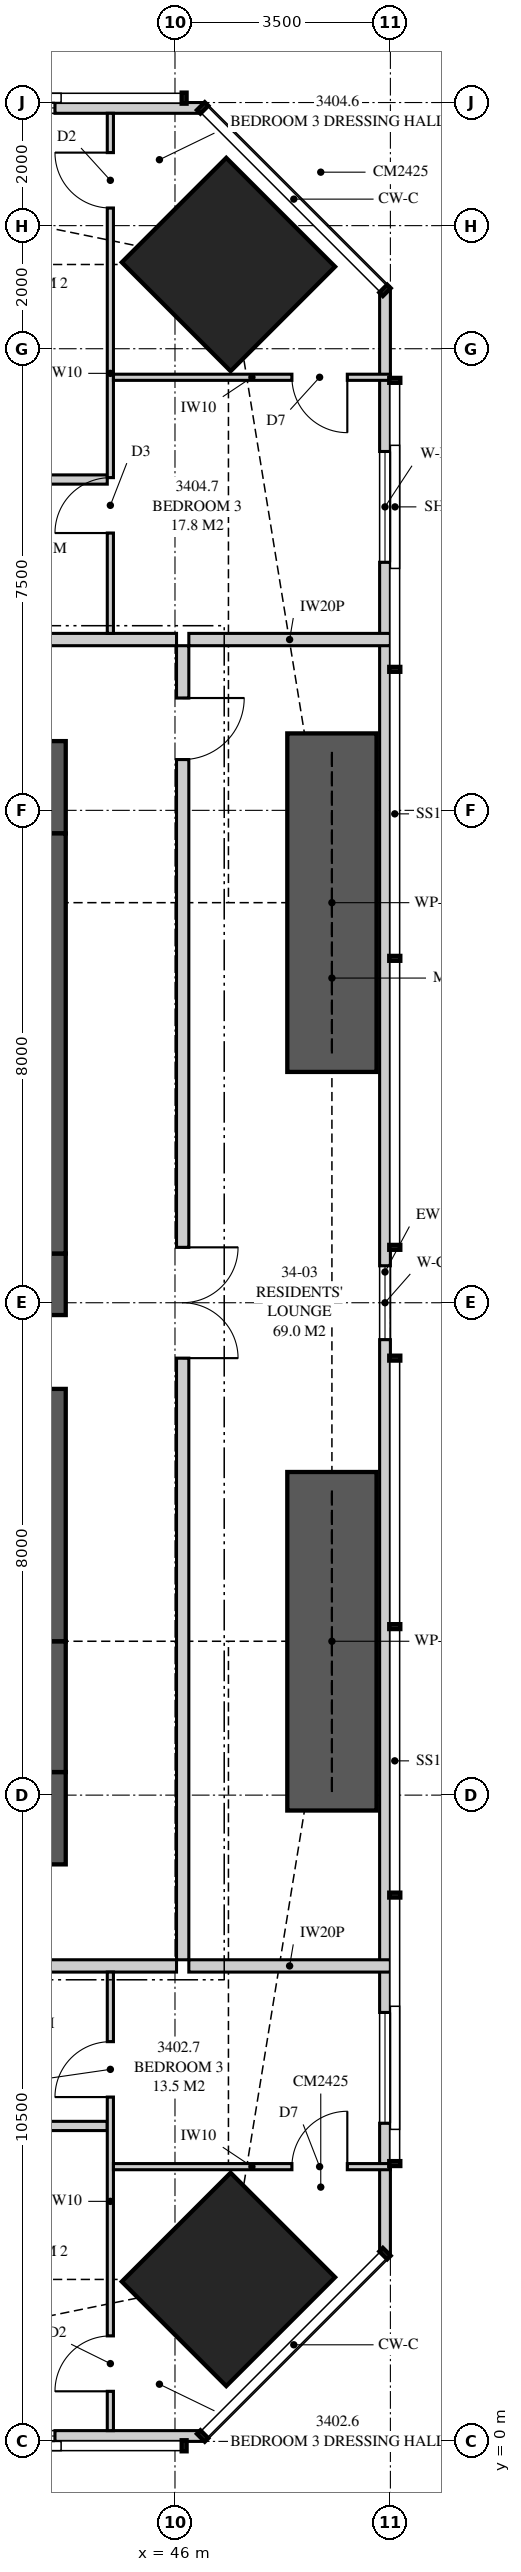
"""IFC4 building model, lengths in metres.
Left out: names, types, materials, properties, quantities, classifications, styles, units other than length and angle.
Written with IfcOpenShell. Run it as: python <this file> out.ifc"""

import sys

from ifc_helpers import new_model, si_unit, direction, frame, frame_2d, origin, origin_2d, place, context, subcontext, project, spatial, polyline, rectangle, outline, extrude, element, fill, save


model = new_model("IFC4")
c1 = context("Model", 3, precision=1e-05, world=origin(), true_north=direction((0.0, 1.0)))
c2 = subcontext(c1, "Body", "Model", "MODEL_VIEW")
j1 = project(units=[si_unit("LENGTHUNIT", "METRE"), si_unit("PLANEANGLEUNIT", "RADIAN")], contexts=[c1])
p1 = place(None, origin())
s1 = spatial("IfcSite", under=j1, at=p1, CompositionType="ELEMENT")
p2 = place(p1, origin())
s2 = spatial("IfcBuilding", under=s1, at=p2, CompositionType="ELEMENT")
p3 = place(p2, frame((0.0, 0.0, 124.95)))
s3 = spatial("IfcBuildingStorey", under=s2, at=p3, CompositionType="ELEMENT", Elevation=124.95)
for number, where, z_axis, x_axis in (
    (1, (46.869, 2.631, 0.0), (0.0, 0.0, 1.0), (-0.707, 0.707, 0.0)),
    (2, (46.869, 35.369, 0.0), (0.0, 0.0, 1.0), (-0.707, -0.707, 0.0)),
):
    element("IfcColumn", number, at=place(p3, frame(where, z_axis=z_axis, x_axis=x_axis)), inside=s3, PredefinedType="COLUMN", context=c2, shape_type="SweptSolid", body=[
        extrude(rectangle(XDim=2.4, YDim=2.5, at=origin_2d()), origin(), (0.0, 0.0, 1.0), 3.35),
    ])
p4 = place(p3, frame((35.9, 10.125, 0.0), z_axis=(0.0, 0.0, 1.0), x_axis=(1.0, 0.0, 0.0)))
e3 = element("IfcWall", 3, at=p4, inside=s3, PredefinedType="SHEAR", context=c2, shape_type="SweptSolid", body=[
    extrude(rectangle(XDim=8.325, YDim=1.5, at=frame_2d((4.163, 0.0))), origin(), (0.0, 0.0, 1.0), 3.35),
])
p5 = place(p4, frame((2.7, 0.0, 0.0)))
e4 = element("IfcOpeningElement", 4, at=p5, cuts=e3, PredefinedType="OPENING", context=c2, shape_type="SweptSolid", body=[
    extrude(rectangle(XDim=1.0, YDim=2.1, at=frame_2d((0.5, 1.05))), frame((0.0, 0.76, 0.0), z_axis=(0.0, -1.0, 0.0), x_axis=(1.0, 0.0, 0.0)), (0.0, 0.0, 1.0), 1.52),
])
p6 = place(p3, frame((44.225, 26.875, 0.0), z_axis=(0.0, 0.0, 1.0), x_axis=(-1.0, 0.0, 0.0)))
e5 = element("IfcWall", 5, at=p6, inside=s3, PredefinedType="SHEAR", context=c2, shape_type="SweptSolid", body=[
    extrude(rectangle(XDim=8.325, YDim=1.5, at=frame_2d((4.163, 0.0))), origin(), (0.0, 0.0, 1.0), 3.35),
])
p7 = place(p6, frame((5.725, 0.0, 0.0)))
e6 = element("IfcOpeningElement", 6, at=p7, cuts=e5, PredefinedType="OPENING", context=c2, shape_type="SweptSolid", body=[
    extrude(rectangle(XDim=0.9, YDim=2.1, at=frame_2d((0.45, 1.05))), frame((0.0, 0.76, 0.0), z_axis=(0.0, -1.0, 0.0), x_axis=(1.0, 0.0, 0.0)), (0.0, 0.0, 1.0), 1.52),
])
p8 = place(p3, frame((43.8, 10.875, 0.0), z_axis=(0.0, 0.0, 1.0), x_axis=(0.0, 1.0, 0.0)))
e7 = element("IfcWall", 7, at=p8, inside=s3, PredefinedType="SHEAR", context=c2, shape_type="SweptSolid", body=[
    extrude(rectangle(XDim=2.125, YDim=0.85, at=frame_2d((1.062, 0.0))), origin(), (0.0, 0.0, 1.0), 3.35),
])
p9 = place(p3, frame((43.8, 13.0, 0.0), z_axis=(0.0, 0.0, 1.0), x_axis=(0.0, 1.0, 0.0)))
e8 = element("IfcWall", 8, at=p9, inside=s3, PredefinedType="SHEAR", context=c2, shape_type="SweptSolid", body=[
    extrude(rectangle(XDim=6.3, YDim=0.85, at=frame_2d((3.15, 0.0))), origin(), (0.0, 0.0, 1.0), 3.35),
])
p10 = place(p9, frame((4.1, 0.0, 0.0)))
e9 = element("IfcOpeningElement", 9, at=p10, cuts=e8, PredefinedType="OPENING", context=c2, shape_type="SweptSolid", body=[
    extrude(rectangle(XDim=1.2, YDim=2.2, at=frame_2d((0.6, 1.1))), frame((0.0, 0.435, 0.0), z_axis=(0.0, -1.0, 0.0), x_axis=(1.0, 0.0, 0.0)), (0.0, 0.0, 1.0), 0.87),
])
p11 = place(p3, frame((43.8, 19.3, 0.0), z_axis=(0.0, 0.0, 1.0), x_axis=(0.0, 1.0, 0.0)))
e10 = element("IfcWall", 10, at=p11, inside=s3, PredefinedType="SHEAR", context=c2, shape_type="SweptSolid", body=[
    extrude(rectangle(XDim=6.825, YDim=0.85, at=frame_2d((3.413, 0.0))), origin(), (0.0, 0.0, 1.0), 3.35),
])
p12 = place(p3, frame((35.775, 0.087, 0.0), z_axis=(0.0, 0.0, 1.0), x_axis=(1.0, 0.0, 0.0)))
e11 = element("IfcWall", 11, at=p12, inside=s3, PredefinedType="SOLIDWALL", context=c2, shape_type="SweptSolid", body=[
    extrude(outline(polyline([(0.0, 0.0), (10.674, 0.0), (10.674, 3.11), (3.053, 3.11), (3.053, 2.15), (3.008, 2.15), (3.008, 3.11), (2.85, 3.11), (2.85, 2.15), (0.0, 2.15), (0.0, 0.0)])), frame((0.0, 0.087, 0.0), z_axis=(0.0, -1.0, 0.0), x_axis=(1.0, 0.0, 0.0)), (0.0, 0.0, 1.0), 0.175),
])
p13 = place(p12, frame((6.475, 0.0, 0.4)))
e12 = element("IfcOpeningElement", 12, at=p13, cuts=e11, PredefinedType="OPENING", context=c2, shape_type="SweptSolid", body=[
    extrude(rectangle(XDim=1.8, YDim=1.7, at=frame_2d((0.9, 0.85))), frame((0.0, 0.097, 0.0), z_axis=(0.0, -1.0, 0.0), x_axis=(1.0, 0.0, 0.0)), (0.0, 0.0, 1.0), 0.195),
])
p14 = place(p3, frame((49.413, 3.051, 0.0), z_axis=(0.0, 0.0, 1.0), x_axis=(0.0, 1.0, 0.0)))
e13 = element("IfcWall", 13, at=p14, inside=s3, PredefinedType="SOLIDWALL", context=c2, shape_type="SweptSolid", body=[
    extrude(outline(polyline([(0.0, 0.0), (31.897, 0.0), (31.897, 3.11), (22.167, 3.11), (22.167, 2.15), (22.074, 2.15), (22.074, 3.11), (21.949, 3.11), (21.949, 2.15), (9.949, 2.15), (9.949, 3.11), (9.823, 3.11), (9.823, 2.15), (9.73, 2.15), (9.73, 3.11), (0.0, 3.11), (0.0, 0.0)])), frame((0.0, 0.087, 0.0), z_axis=(0.0, -1.0, 0.0), x_axis=(1.0, 0.0, 0.0)), (0.0, 0.0, 1.0), 0.175),
])
p15 = place(p14, frame((2.118, 0.0, 0.4)))
e14 = element("IfcOpeningElement", 14, at=p15, cuts=e13, PredefinedType="OPENING", context=c2, shape_type="SweptSolid", body=[
    extrude(rectangle(XDim=1.8, YDim=1.7, at=frame_2d((0.9, 0.85))), frame((0.0, 0.097, 0.0), z_axis=(0.0, -1.0, 0.0), x_axis=(1.0, 0.0, 0.0)), (0.0, 0.0, 1.0), 0.195),
])
p16 = place(p14, frame((14.849, 0.0, 0.4)))
e15 = element("IfcOpeningElement", 15, at=p16, cuts=e13, PredefinedType="OPENING", context=c2, shape_type="SweptSolid", body=[
    extrude(rectangle(XDim=1.2, YDim=1.7, at=frame_2d((0.6, 0.85))), frame((0.0, 0.097, 0.0), z_axis=(0.0, -1.0, 0.0), x_axis=(1.0, 0.0, 0.0)), (0.0, 0.0, 1.0), 0.195),
])
p17 = place(p14, frame((27.479, 0.0, 0.4)))
e16 = element("IfcOpeningElement", 16, at=p17, cuts=e13, PredefinedType="OPENING", context=c2, shape_type="SweptSolid", body=[
    extrude(rectangle(XDim=1.8, YDim=1.7, at=frame_2d((0.9, 0.85))), frame((0.0, 0.097, 0.0), z_axis=(0.0, -1.0, 0.0), x_axis=(1.0, 0.0, 0.0)), (0.0, 0.0, 1.0), 0.195),
])
p18 = place(p3, frame((46.449, 37.913, 0.0), z_axis=(0.0, 0.0, 1.0), x_axis=(-1.0, 0.0, 0.0)))
e17 = element("IfcWall", 17, at=p18, inside=s3, PredefinedType="SOLIDWALL", context=c2, shape_type="SweptSolid", body=[
    extrude(outline(polyline([(0.0, 0.0), (10.674, 0.0), (10.674, 2.15), (7.824, 2.15), (7.824, 3.11), (7.666, 3.11), (7.666, 2.15), (7.62, 2.15), (7.62, 3.11), (0.0, 3.11), (0.0, 0.0)])), frame((0.0, 0.087, 0.0), z_axis=(0.0, -1.0, 0.0), x_axis=(1.0, 0.0, 0.0)), (0.0, 0.0, 1.0), 0.175),
])
p19 = place(p18, frame((2.399, 0.0, 0.4)))
e18 = element("IfcOpeningElement", 18, at=p19, cuts=e17, PredefinedType="OPENING", context=c2, shape_type="SweptSolid", body=[
    extrude(rectangle(XDim=1.8, YDim=1.7, at=frame_2d((0.9, 0.85))), frame((0.0, 0.097, 0.0), z_axis=(0.0, -1.0, 0.0), x_axis=(1.0, 0.0, 0.0)), (0.0, 0.0, 1.0), 0.195),
])
p20 = place(p3, frame((44.95, 0.175, 0.0), z_axis=(0.0, 0.0, 1.0), x_axis=(0.0, 1.0, 0.0)))
e19 = element("IfcWall", 19, at=p20, inside=s3, PredefinedType="PARTITIONING", context=c2, shape_type="SweptSolid", body=[
    extrude(outline(polyline([(0.0, 0.0), (7.45, 0.0), (7.45, 3.11), (3.716, 3.11), (3.716, 2.51), (2.943, 2.51), (2.943, 2.15), (1.188, 2.15), (1.188, 3.11), (0.0, 3.11), (0.0, 0.0)])), frame((0.0, 0.05, 0.0), z_axis=(0.0, -1.0, 0.0), x_axis=(1.0, 0.0, 0.0)), (0.0, 0.0, 1.0), 0.1),
])
p21 = place(p20, frame((0.639, 0.0, 0.0)))
e20 = element("IfcOpeningElement", 20, at=p21, cuts=e19, PredefinedType="OPENING", context=c2, shape_type="SweptSolid", body=[
    extrude(rectangle(XDim=0.9, YDim=2.1, at=frame_2d((0.45, 1.05))), frame((0.0, 0.06, 0.0), z_axis=(0.0, -1.0, 0.0), x_axis=(1.0, 0.0, 0.0)), (0.0, 0.0, 1.0), 0.12),
])
p22 = place(p20, frame((5.419, 0.0, 0.0)))
e21 = element("IfcOpeningElement", 21, at=p22, cuts=e19, PredefinedType="OPENING", context=c2, shape_type="SweptSolid", body=[
    extrude(rectangle(XDim=0.9, YDim=2.1, at=frame_2d((0.45, 1.05))), frame((0.0, 0.06, 0.0), z_axis=(0.0, -1.0, 0.0), x_axis=(1.0, 0.0, 0.0)), (0.0, 0.0, 1.0), 0.12),
])
p23 = place(p3, frame((41.4, 5.125, 0.0), z_axis=(0.0, 0.0, 1.0), x_axis=(1.0, 0.0, 0.0)))
e22 = element("IfcWall", 22, at=p23, inside=s3, PredefinedType="PLUMBINGWALL", context=c2, shape_type="SweptSolid", body=[
    extrude(rectangle(XDim=3.5, YDim=0.15, at=frame_2d((1.75, 0.0))), origin(), (0.0, 0.0, 1.0), 3.11),
])
p24 = place(p3, frame((45.0, 4.464, 0.0), z_axis=(0.0, 0.0, 1.0), x_axis=(1.0, 0.0, 0.0)))
e23 = element("IfcWall", 23, at=p24, inside=s3, PredefinedType="PARTITIONING", context=c2, shape_type="SweptSolid", body=[
    extrude(outline(polyline([(0.0, 0.0), (4.5, 0.0), (4.5, 3.11), (3.037, 3.11), (3.037, 2.15), (1.294, 2.15), (1.294, 3.11), (0.0, 3.11), (0.0, 0.0)])), frame((0.0, 0.05, 0.0), z_axis=(0.0, -1.0, 0.0), x_axis=(1.0, 0.0, 0.0)), (0.0, 0.0, 1.0), 0.1),
])
p25 = place(p24, frame((2.9, 0.0, 0.0)))
e24 = element("IfcOpeningElement", 24, at=p25, cuts=e23, PredefinedType="OPENING", context=c2, shape_type="SweptSolid", body=[
    extrude(rectangle(XDim=0.9, YDim=2.1, at=frame_2d((0.45, 1.05))), frame((0.0, 0.06, 0.0), z_axis=(0.0, -1.0, 0.0), x_axis=(1.0, 0.0, 0.0)), (0.0, 0.0, 1.0), 0.12),
])
p26 = place(p3, frame((46.225, 7.725, 0.0), z_axis=(0.0, 0.0, 1.0), x_axis=(1.0, 0.0, 0.0)))
e25 = element("IfcWall", 25, at=p26, inside=s3, PredefinedType="PARTITIONING", context=c2, shape_type="SweptSolid", body=[
    extrude(outline(polyline([(0.0, 0.0), (3.275, 0.0), (3.275, 3.11), (2.392, 3.11), (2.392, 2.15), (0.643, 2.15), (0.643, 2.541), (0.306, 2.541), (0.306, 3.11), (0.0, 3.11), (0.0, 0.0)])), frame((0.0, 0.1, 0.0), z_axis=(0.0, -1.0, 0.0), x_axis=(1.0, 0.0, 0.0)), (0.0, 0.0, 1.0), 0.2),
])
p27 = place(p3, frame((44.95, 37.825, 0.0), z_axis=(0.0, 0.0, 1.0), x_axis=(0.0, -1.0, 0.0)))
e26 = element("IfcWall", 26, at=p27, inside=s3, PredefinedType="PARTITIONING", context=c2, shape_type="SweptSolid", body=[
    extrude(outline(polyline([(0.0, 0.0), (8.45, 0.0), (8.45, 3.11), (3.716, 3.11), (3.716, 2.51), (2.943, 2.51), (2.943, 2.15), (1.188, 2.15), (1.188, 3.11), (0.0, 3.11), (0.0, 0.0)])), frame((0.0, 0.05, 0.0), z_axis=(0.0, -1.0, 0.0), x_axis=(1.0, 0.0, 0.0)), (0.0, 0.0, 1.0), 0.1),
])
p28 = place(p27, frame((0.639, 0.0, 0.0)))
e27 = element("IfcOpeningElement", 27, at=p28, cuts=e26, PredefinedType="OPENING", context=c2, shape_type="SweptSolid", body=[
    extrude(rectangle(XDim=0.9, YDim=2.1, at=frame_2d((0.45, 1.05))), frame((0.0, 0.06, 0.0), z_axis=(0.0, -1.0, 0.0), x_axis=(1.0, 0.0, 0.0)), (0.0, 0.0, 1.0), 0.12),
])
p29 = place(p27, frame((5.919, 0.0, 0.0)))
e28 = element("IfcOpeningElement", 28, at=p29, cuts=e26, PredefinedType="OPENING", context=c2, shape_type="SweptSolid", body=[
    extrude(rectangle(XDim=0.9, YDim=2.1, at=frame_2d((0.45, 1.05))), frame((0.0, 0.06, 0.0), z_axis=(0.0, -1.0, 0.0), x_axis=(1.0, 0.0, 0.0)), (0.0, 0.0, 1.0), 0.12),
])
p30 = place(p3, frame((41.4, 31.875, 0.0), z_axis=(0.0, 0.0, 1.0), x_axis=(1.0, 0.0, 0.0)))
e29 = element("IfcWall", 29, at=p30, inside=s3, PredefinedType="PLUMBINGWALL", context=c2, shape_type="SweptSolid", body=[
    extrude(rectangle(XDim=3.5, YDim=0.15, at=frame_2d((1.75, 0.0))), origin(), (0.0, 0.0, 1.0), 3.11),
])
p31 = place(p3, frame((45.0, 33.536, 0.0), z_axis=(0.0, 0.0, 1.0), x_axis=(1.0, 0.0, 0.0)))
e30 = element("IfcWall", 30, at=p31, inside=s3, PredefinedType="PARTITIONING", context=c2, shape_type="SweptSolid", body=[
    extrude(outline(polyline([(0.0, 0.0), (4.5, 0.0), (4.5, 3.11), (3.037, 3.11), (3.037, 2.15), (1.294, 2.15), (1.294, 3.11), (0.0, 3.11), (0.0, 0.0)])), frame((0.0, 0.05, 0.0), z_axis=(0.0, -1.0, 0.0), x_axis=(1.0, 0.0, 0.0)), (0.0, 0.0, 1.0), 0.1),
])
p32 = place(p31, frame((2.9, 0.0, 0.0)))
e31 = element("IfcOpeningElement", 31, at=p32, cuts=e30, PredefinedType="OPENING", context=c2, shape_type="SweptSolid", body=[
    extrude(rectangle(XDim=0.9, YDim=2.1, at=frame_2d((0.45, 1.05))), frame((0.0, 0.06, 0.0), z_axis=(0.0, -1.0, 0.0), x_axis=(1.0, 0.0, 0.0)), (0.0, 0.0, 1.0), 0.12),
])
p33 = place(p3, frame((46.225, 29.275, 0.0), z_axis=(0.0, 0.0, 1.0), x_axis=(1.0, 0.0, 0.0)))
e32 = element("IfcWall", 32, at=p33, inside=s3, PredefinedType="PARTITIONING", context=c2, shape_type="SweptSolid", body=[
    extrude(outline(polyline([(0.0, 0.0), (3.275, 0.0), (3.275, 3.11), (2.554, 3.11), (2.554, 2.15), (0.805, 2.15), (0.805, 2.541), (0.306, 2.541), (0.306, 3.11), (0.0, 3.11), (0.0, 0.0)])), frame((0.0, 0.1, 0.0), z_axis=(0.0, -1.0, 0.0), x_axis=(1.0, 0.0, 0.0)), (0.0, 0.0, 1.0), 0.2),
])
p34 = place(p3, frame((46.125, 7.825, 0.0), z_axis=(0.0, 0.0, 1.0), x_axis=(0.0, 1.0, 0.0)))
e33 = element("IfcWall", 33, at=p34, inside=s3, PredefinedType="PARTITIONING", context=c2, shape_type="SweptSolid", body=[
    extrude(outline(polyline([(0.0, 0.0), (21.35, 0.0), (21.35, 3.11), (17.512, 3.11), (17.512, 2.541), (16.838, 2.541), (16.838, 3.11), (5.512, 3.11), (5.512, 2.541), (4.838, 2.541), (4.838, 3.11), (0.0, 3.11), (0.0, 0.0)])), frame((0.0, 0.1, 0.0), z_axis=(0.0, -1.0, 0.0), x_axis=(1.0, 0.0, 0.0)), (0.0, 0.0, 1.0), 0.2),
])
p35 = place(p34, frame((9.775, 0.0, 0.0)))
e34 = element("IfcOpeningElement", 34, at=p35, cuts=e33, PredefinedType="OPENING", context=c2, shape_type="SweptSolid", body=[
    extrude(rectangle(XDim=1.8, YDim=2.1, at=frame_2d((0.9, 1.05))), frame((0.0, 0.11, 0.0), z_axis=(0.0, -1.0, 0.0), x_axis=(1.0, 0.0, 0.0)), (0.0, 0.0, 1.0), 0.22),
])
p36 = place(p34, frame((19.5, 0.0, 0.0)))
e35 = element("IfcOpeningElement", 35, at=p36, cuts=e33, PredefinedType="OPENING", context=c2, shape_type="SweptSolid", body=[
    extrude(rectangle(XDim=1.0, YDim=2.1, at=frame_2d((0.5, 1.05))), frame((0.0, 0.11, 0.0), z_axis=(0.0, -1.0, 0.0), x_axis=(1.0, 0.0, 0.0)), (0.0, 0.0, 1.0), 0.22),
])
p37 = place(p3, frame((39.6, 7.725, 0.0), z_axis=(0.0, 0.0, 1.0), x_axis=(1.0, 0.0, 0.0)))
e36 = element("IfcWall", 36, at=p37, inside=s3, PredefinedType="PARTITIONING", context=c2, shape_type="SweptSolid", body=[
    extrude(rectangle(XDim=6.425, YDim=0.2, at=frame_2d((3.212, 0.0))), origin(), (0.0, 0.0, 1.0), 3.11),
])
p38 = place(p3, frame((40.8, 29.275, 0.0), z_axis=(0.0, 0.0, 1.0), x_axis=(1.0, 0.0, 0.0)))
e37 = element("IfcWall", 37, at=p38, inside=s3, PredefinedType="PARTITIONING", context=c2, shape_type="SweptSolid", body=[
    extrude(rectangle(XDim=5.225, YDim=0.2, at=frame_2d((2.612, 0.0))), origin(), (0.0, 0.0, 1.0), 3.11),
])
for number, where, z_axis, x_axis in (
    (38, (48.55, 10.25, 0.0), (0.0, 0.0, 1.0), (0.0, 1.0, 0.0)),
    (39, (48.55, 22.25, 0.0), (0.0, 0.0, 1.0), (0.0, 1.0, 0.0)),
):
    element("IfcWall", number, at=place(p3, frame(where, z_axis=z_axis, x_axis=x_axis)), inside=s3, PredefinedType="SHEAR", context=c2, shape_type="SweptSolid", body=[
        extrude(rectangle(XDim=5.5, YDim=1.45, at=frame_2d((2.75, 0.0))), origin(), (0.0, 0.0, 1.0), 3.35),
    ])
p39 = place(p13, origin())
e40 = element("IfcWindow", 40, at=p39, inside=s3, PartitioningType="SINGLE_PANEL", PredefinedType="WINDOW", context=c2, shape_type="SweptSolid", body=[
    extrude(rectangle(XDim=1.8, YDim=1.7, at=frame_2d((0.9, 0.85))), frame((0.0, 0.03, 0.0), z_axis=(0.0, -1.0, 0.0), x_axis=(1.0, 0.0, 0.0)), (0.0, 0.0, 1.0), 0.06),
])
fill(e12, e40)
p40 = place(p15, origin())
e41 = element("IfcWindow", 41, at=p40, inside=s3, PartitioningType="SINGLE_PANEL", PredefinedType="WINDOW", context=c2, shape_type="SweptSolid", body=[
    extrude(rectangle(XDim=1.8, YDim=1.7, at=frame_2d((0.9, 0.85))), frame((0.0, 0.03, 0.0), z_axis=(0.0, -1.0, 0.0), x_axis=(1.0, 0.0, 0.0)), (0.0, 0.0, 1.0), 0.06),
])
fill(e14, e41)
p41 = place(p16, origin())
e42 = element("IfcWindow", 42, at=p41, inside=s3, PartitioningType="SINGLE_PANEL", PredefinedType="WINDOW", context=c2, shape_type="SweptSolid", body=[
    extrude(rectangle(XDim=1.2, YDim=1.7, at=frame_2d((0.6, 0.85))), frame((0.0, 0.03, 0.0), z_axis=(0.0, -1.0, 0.0), x_axis=(1.0, 0.0, 0.0)), (0.0, 0.0, 1.0), 0.06),
])
fill(e15, e42)
p42 = place(p17, origin())
e43 = element("IfcWindow", 43, at=p42, inside=s3, PartitioningType="SINGLE_PANEL", PredefinedType="WINDOW", context=c2, shape_type="SweptSolid", body=[
    extrude(rectangle(XDim=1.8, YDim=1.7, at=frame_2d((0.9, 0.85))), frame((0.0, 0.03, 0.0), z_axis=(0.0, -1.0, 0.0), x_axis=(1.0, 0.0, 0.0)), (0.0, 0.0, 1.0), 0.06),
])
fill(e16, e43)
p43 = place(p19, origin())
e44 = element("IfcWindow", 44, at=p43, inside=s3, PartitioningType="SINGLE_PANEL", PredefinedType="WINDOW", context=c2, shape_type="SweptSolid", body=[
    extrude(rectangle(XDim=1.8, YDim=1.7, at=frame_2d((0.9, 0.85))), frame((0.0, 0.03, 0.0), z_axis=(0.0, -1.0, 0.0), x_axis=(1.0, 0.0, 0.0)), (0.0, 0.0, 1.0), 0.06),
])
fill(e18, e44)
p44 = place(p25, origin())
e45 = element("IfcDoor", 45, at=p44, inside=s3, OperationType="SINGLE_SWING_RIGHT", PredefinedType="DOOR", context=c2, shape_type="SweptSolid", body=[
    extrude(rectangle(XDim=0.9, YDim=2.1, at=frame_2d((0.45, 1.05))), frame((0.0, 0.025, 0.0), z_axis=(0.0, -1.0, 0.0), x_axis=(1.0, 0.0, 0.0)), (0.0, 0.0, 1.0), 0.05),
])
fill(e24, e45)
p45 = place(p21, origin())
e46 = element("IfcDoor", 46, at=p45, inside=s3, OperationType="SINGLE_SWING_LEFT", PredefinedType="DOOR", context=c2, shape_type="SweptSolid", body=[
    extrude(rectangle(XDim=0.9, YDim=2.1, at=frame_2d((0.45, 1.05))), frame((0.0, 0.025, 0.0), z_axis=(0.0, -1.0, 0.0), x_axis=(1.0, 0.0, 0.0)), (0.0, 0.0, 1.0), 0.05),
])
fill(e20, e46)
p46 = place(p22, origin())
e47 = element("IfcDoor", 47, at=p46, inside=s3, OperationType="SINGLE_SWING_LEFT", PredefinedType="DOOR", context=c2, shape_type="SweptSolid", body=[
    extrude(rectangle(XDim=0.9, YDim=2.1, at=frame_2d((0.45, 1.05))), frame((0.0, 0.025, 0.0), z_axis=(0.0, -1.0, 0.0), x_axis=(1.0, 0.0, 0.0)), (0.0, 0.0, 1.0), 0.05),
])
fill(e21, e47)
p47 = place(p32, frame((0.9, 0.0, 0.0), z_axis=(0.0, 0.0, 1.0), x_axis=(-1.0, 0.0, 0.0)))
e48 = element("IfcDoor", 48, at=p47, inside=s3, OperationType="SINGLE_SWING_LEFT", PredefinedType="DOOR", context=c2, shape_type="SweptSolid", body=[
    extrude(rectangle(XDim=0.9, YDim=2.1, at=frame_2d((0.45, 1.05))), frame((0.0, 0.025, 0.0), z_axis=(0.0, -1.0, 0.0), x_axis=(1.0, 0.0, 0.0)), (0.0, 0.0, 1.0), 0.05),
])
fill(e31, e48)
p48 = place(p28, frame((0.9, 0.0, 0.0), z_axis=(0.0, 0.0, 1.0), x_axis=(-1.0, 0.0, 0.0)))
e49 = element("IfcDoor", 49, at=p48, inside=s3, OperationType="SINGLE_SWING_RIGHT", PredefinedType="DOOR", context=c2, shape_type="SweptSolid", body=[
    extrude(rectangle(XDim=0.9, YDim=2.1, at=frame_2d((0.45, 1.05))), frame((0.0, 0.025, 0.0), z_axis=(0.0, -1.0, 0.0), x_axis=(1.0, 0.0, 0.0)), (0.0, 0.0, 1.0), 0.05),
])
fill(e27, e49)
p49 = place(p29, frame((0.9, 0.0, 0.0), z_axis=(0.0, 0.0, 1.0), x_axis=(-1.0, 0.0, 0.0)))
e50 = element("IfcDoor", 50, at=p49, inside=s3, OperationType="SINGLE_SWING_LEFT", PredefinedType="DOOR", context=c2, shape_type="SweptSolid", body=[
    extrude(rectangle(XDim=0.9, YDim=2.1, at=frame_2d((0.45, 1.05))), frame((0.0, 0.025, 0.0), z_axis=(0.0, -1.0, 0.0), x_axis=(1.0, 0.0, 0.0)), (0.0, 0.0, 1.0), 0.05),
])
fill(e28, e50)
p50 = place(p35, frame((1.8, 0.0, 0.0), z_axis=(0.0, 0.0, 1.0), x_axis=(-1.0, 0.0, 0.0)))
e51 = element("IfcDoor", 51, at=p50, inside=s3, OperationType="DOUBLE_DOOR_SINGLE_SWING", PredefinedType="DOOR", context=c2, shape_type="SweptSolid", body=[
    extrude(rectangle(XDim=1.8, YDim=2.1, at=frame_2d((0.9, 1.05))), frame((0.0, 0.025, 0.0), z_axis=(0.0, -1.0, 0.0), x_axis=(1.0, 0.0, 0.0)), (0.0, 0.0, 1.0), 0.05),
])
fill(e34, e51)
p51 = place(p36, frame((1.0, 0.0, 0.0), z_axis=(0.0, 0.0, 1.0), x_axis=(-1.0, 0.0, 0.0)))
e52 = element("IfcDoor", 52, at=p51, inside=s3, OperationType="SINGLE_SWING_LEFT", PredefinedType="DOOR", context=c2, shape_type="SweptSolid", body=[
    extrude(rectangle(XDim=1.0, YDim=2.1, at=frame_2d((0.5, 1.05))), frame((0.0, 0.025, 0.0), z_axis=(0.0, -1.0, 0.0), x_axis=(1.0, 0.0, 0.0)), (0.0, 0.0, 1.0), 0.05),
])
fill(e35, e52)
save(model, sys.argv[1])
